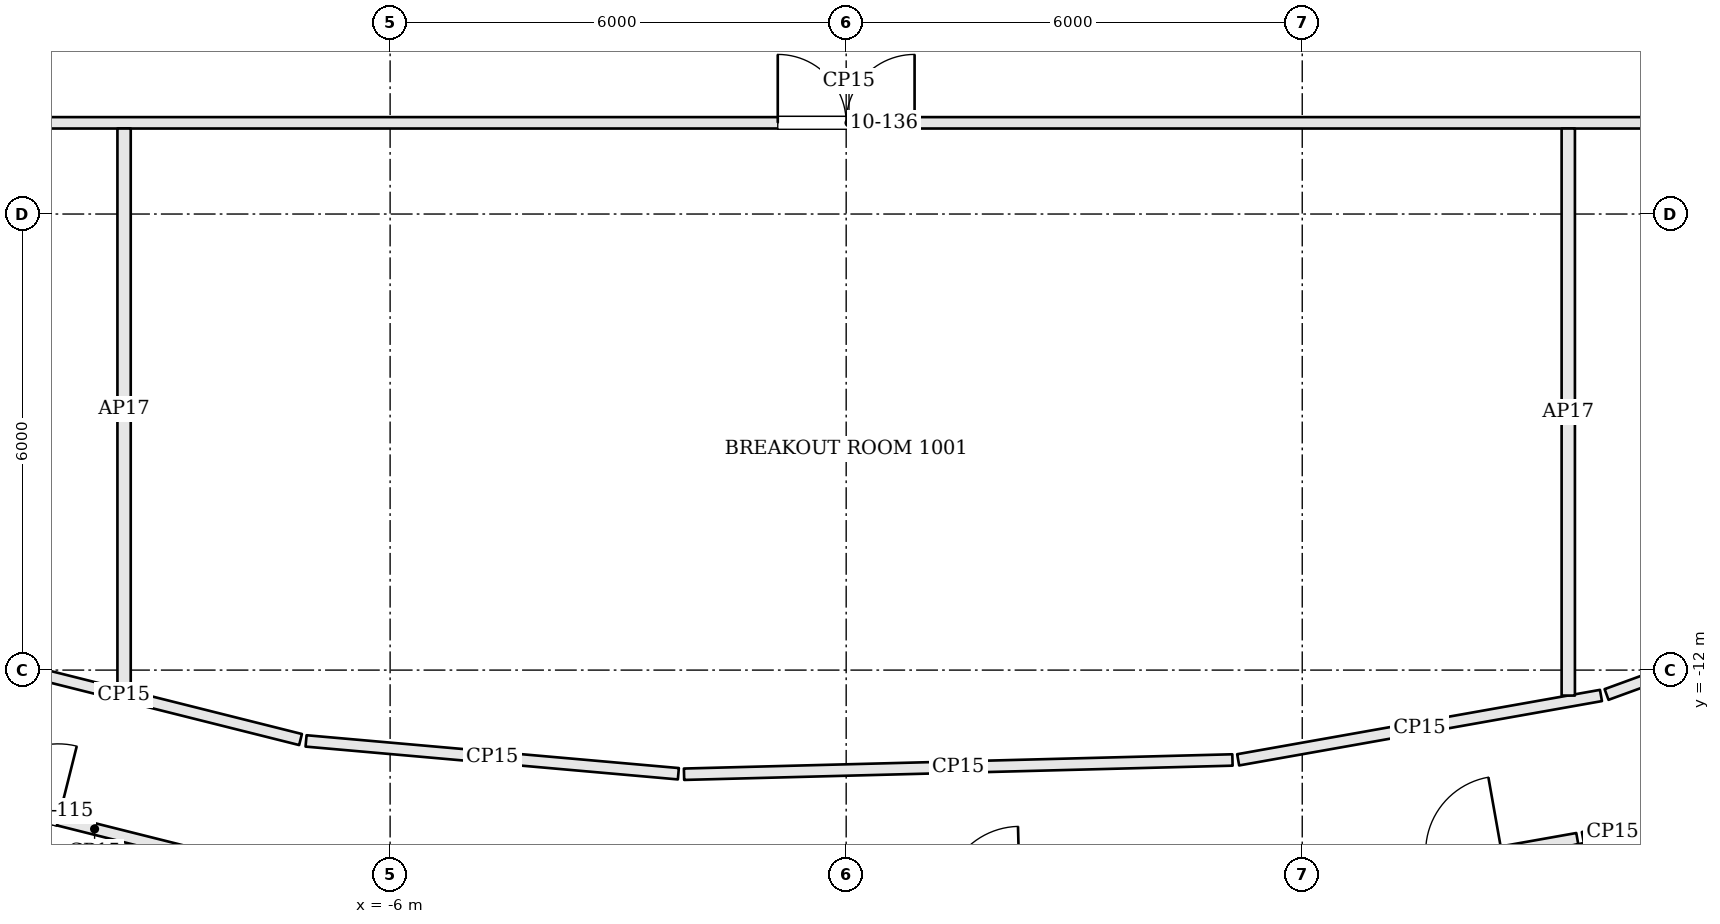
"""IFC4 building model, lengths in metres.
Left out: names, types, materials, properties, quantities, classifications, styles, units other than length and angle.
Written with IfcOpenShell. Run it as: python <this file> out.ifc"""

import sys

from ifc_helpers import new_model, si_unit, direction, frame, frame_2d, origin, place, context, subcontext, project, spatial, rectangle, extrude, element, fill, save


model = new_model("IFC4")
c1 = context("Model", 3, precision=1e-05, world=origin(), true_north=direction((0.0, 1.0)))
c2 = subcontext(c1, "Body", "Model", "MODEL_VIEW")
j1 = project(units=[si_unit("LENGTHUNIT", "METRE"), si_unit("PLANEANGLEUNIT", "RADIAN")], contexts=[c1])
p1 = place(None, origin())
s1 = spatial("IfcSite", under=j1, at=p1, CompositionType="ELEMENT")
p2 = place(p1, origin())
s2 = spatial("IfcBuilding", under=s1, at=p2, CompositionType="ELEMENT")
p3 = place(p2, frame((0.0, 0.0, 51.9)))
s3 = spatial("IfcBuildingStorey", under=s2, at=p3, CompositionType="ELEMENT", Elevation=51.9)
p4 = place(p3, frame((-12.371, -13.468, 0.0), z_axis=(0.0, 0.0, 1.0), x_axis=(0.969987994087, -0.243152814764, 0.0)))
e1 = element("IfcWall", 1, at=p4, inside=s3, PredefinedType="PARTITIONING", context=c2, shape_type="SweptSolid", body=[
    extrude(rectangle(XDim=5.119, YDim=0.15, at=frame_2d((2.559, 0.0))), origin(), (0.0, 0.0, 1.0), 2.68),
])
p5 = place(p4, frame((1.067, 0.0, 0.0)))
e2 = element("IfcOpeningElement", 2, at=p5, cuts=e1, PredefinedType="OPENING", context=c2, shape_type="SweptSolid", body=[
    extrude(rectangle(XDim=1.0, YDim=2.1, at=frame_2d((0.5, 1.05))), frame((0.0, 0.085, 0.0), z_axis=(0.0, -1.0, 0.0), x_axis=(1.0, 0.0, 0.0)), (0.0, 0.0, 1.0), 0.17),
])
p6 = place(p3, frame((5.413, -14.963, 0.0), z_axis=(0.0, 0.0, 1.0), x_axis=(0.984637058407, 0.174613468012, 0.0)))
e3 = element("IfcWall", 3, at=p6, inside=s3, PredefinedType="PARTITIONING", context=c2, shape_type="SweptSolid", body=[
    extrude(rectangle(XDim=4.271, YDim=0.15, at=frame_2d((2.136, 0.0))), origin(), (0.0, 0.0, 1.0), 2.68),
])
p7 = place(p6, frame((2.261, 0.0, 0.0)))
e4 = element("IfcOpeningElement", 4, at=p7, cuts=e3, PredefinedType="OPENING", context=c2, shape_type="SweptSolid", body=[
    extrude(rectangle(XDim=1.0, YDim=2.1, at=frame_2d((0.5, 1.05))), frame((0.0, 0.085, 0.0), z_axis=(0.0, -1.0, 0.0), x_axis=(1.0, 0.0, 0.0)), (0.0, 0.0, 1.0), 0.17),
])
p8 = place(p3, frame((11.707, -22.956, 0.0), z_axis=(0.0, 0.0, 1.0), x_axis=(-0.232387269729, 0.972623337612, 0.0)))
e5 = element("IfcWall", 5, at=p8, inside=s3, PredefinedType="PARTITIONING", context=c2, shape_type="SweptSolid", body=[
    extrude(rectangle(XDim=8.91, YDim=0.175, at=frame_2d((4.455, 0.0))), origin(), (0.0, 0.0, 1.0), 2.68),
])
p9 = place(p3, frame((9.692, -14.204, 0.0), z_axis=(0.0, 0.0, 1.0), x_axis=(0.984624975399, 0.174681589816, 0.0)))
e6 = element("IfcWall", 6, at=p9, inside=s3, PredefinedType="PARTITIONING", context=c2, shape_type="SweptSolid", body=[
    extrude(rectangle(XDim=0.792, YDim=0.15, at=frame_2d((0.396, 0.0))), origin(), (0.0, 0.0, 1.0), 2.68),
])
p10 = place(p3, frame((13.511, -11.043, 0.0), z_axis=(0.0, 0.0, 1.0), x_axis=(-0.939583191704, -0.342320647736, 0.0)))
e7 = element("IfcWall", 7, at=p10, inside=s3, PredefinedType="PARTITIONING", context=c2, shape_type="SweptSolid", body=[
    extrude(rectangle(XDim=3.733, YDim=0.15, at=frame_2d((1.866, 0.0))), origin(), (0.0, 0.0, 1.0), 2.68),
])
p11 = place(p3, frame((9.93, -12.334, 0.0), z_axis=(0.0, 0.0, 1.0), x_axis=(-0.984638212434, -0.174606960386, 0.0)))
e8 = element("IfcWall", 8, at=p11, inside=s3, PredefinedType="PARTITIONING", context=c2, shape_type="SweptSolid", body=[
    extrude(rectangle(XDim=4.848, YDim=0.15, at=frame_2d((2.424, 0.0))), origin(), (0.0, 0.0, 1.0), 2.68),
])
p12 = place(p3, frame((5.082, -13.182, 0.0), z_axis=(0.0, 0.0, 1.0), x_axis=(-0.999661624383, -0.026012242045, 0.0)))
e9 = element("IfcWall", 9, at=p12, inside=s3, PredefinedType="PARTITIONING", context=c2, shape_type="SweptSolid", body=[
    extrude(rectangle(XDim=7.218, YDim=0.15, at=frame_2d((3.609, 0.0))), origin(), (0.0, 0.0, 1.0), 2.68),
])
p13 = place(p3, frame((-2.208, -13.364, 0.0), z_axis=(0.0, 0.0, 1.0), x_axis=(-0.996134962793, 0.087835846335, 0.0)))
e10 = element("IfcWall", 10, at=p13, inside=s3, PredefinedType="PARTITIONING", context=c2, shape_type="SweptSolid", body=[
    extrude(rectangle(XDim=4.917, YDim=0.15, at=frame_2d((2.458, 0.0))), origin(), (0.0, 0.0, 1.0), 2.68),
])
p14 = place(p3, frame((-7.178, -12.914, 0.0), z_axis=(0.0, 0.0, 1.0), x_axis=(-0.969983523639, 0.243170647628, 0.0)))
e11 = element("IfcWall", 11, at=p14, inside=s3, PredefinedType="PARTITIONING", context=c2, shape_type="SweptSolid", body=[
    extrude(rectangle(XDim=4.794, YDim=0.15, at=frame_2d((2.397, 0.0))), origin(), (0.0, 0.0, 1.0), 2.68),
])
p15 = place(p3, frame((-14.725, -4.8, 0.0), z_axis=(0.0, 0.0, 1.0), x_axis=(1.0, 0.0, 0.0)))
e12 = element("IfcWall", 12, at=p15, inside=s3, PredefinedType="PARTITIONING", context=c2, shape_type="SweptSolid", body=[
    extrude(rectangle(XDim=29.525, YDim=0.15, at=frame_2d((14.763, 0.0))), origin(), (0.0, 0.0, 1.0), 2.68),
])
p16 = place(p15, frame((13.825, 0.0, 0.0)))
e13 = element("IfcOpeningElement", 13, at=p16, cuts=e12, PredefinedType="OPENING", context=c2, shape_type="SweptSolid", body=[
    extrude(rectangle(XDim=1.8, YDim=2.1, at=frame_2d((0.9, 1.05))), frame((0.0, 0.085, 0.0), z_axis=(0.0, -1.0, 0.0), x_axis=(1.0, 0.0, 0.0)), (0.0, 0.0, 1.0), 0.17),
])
p17 = place(p3, frame((-9.5, -12.257, 0.0), z_axis=(0.0, 0.0, 1.0), x_axis=(0.0, 1.0, 0.0)))
e14 = element("IfcWall", 14, at=p17, inside=s3, PredefinedType="PARTITIONING", context=c2, shape_type="SweptSolid", body=[
    extrude(rectangle(XDim=7.382, YDim=0.175, at=frame_2d((3.691, 0.0))), origin(), (0.0, 0.0, 1.0), 2.68),
])
p18 = place(p3, frame((9.5, -12.335, 0.0), z_axis=(0.0, 0.0, 1.0), x_axis=(0.0, 1.0, 0.0)))
e15 = element("IfcWall", 15, at=p18, inside=s3, PredefinedType="PARTITIONING", context=c2, shape_type="SweptSolid", body=[
    extrude(rectangle(XDim=7.46, YDim=0.175, at=frame_2d((3.73, 0.0))), origin(), (0.0, 0.0, 1.0), 2.68),
])
p19 = place(p5, origin())
e16 = element("IfcDoor", 16, at=p19, inside=s3, OperationType="SINGLE_SWING_RIGHT", PredefinedType="DOOR", context=c2, shape_type="SweptSolid", body=[
    extrude(rectangle(XDim=1.0, YDim=2.1, at=frame_2d((0.5, 1.05))), frame((0.0, 0.025, 0.0), z_axis=(0.0, -1.0, 0.0), x_axis=(1.0, 0.0, 0.0)), (0.0, 0.0, 1.0), 0.05),
])
fill(e2, e16)
p20 = place(p16, origin())
e17 = element("IfcDoor", 17, at=p20, inside=s3, OperationType="DOUBLE_DOOR_SINGLE_SWING", PredefinedType="DOOR", context=c2, shape_type="SweptSolid", body=[
    extrude(rectangle(XDim=1.8, YDim=2.1, at=frame_2d((0.9, 1.05))), frame((0.0, 0.025, 0.0), z_axis=(0.0, -1.0, 0.0), x_axis=(1.0, 0.0, 0.0)), (0.0, 0.0, 1.0), 0.05),
])
fill(e13, e17)
save(model, sys.argv[1])
